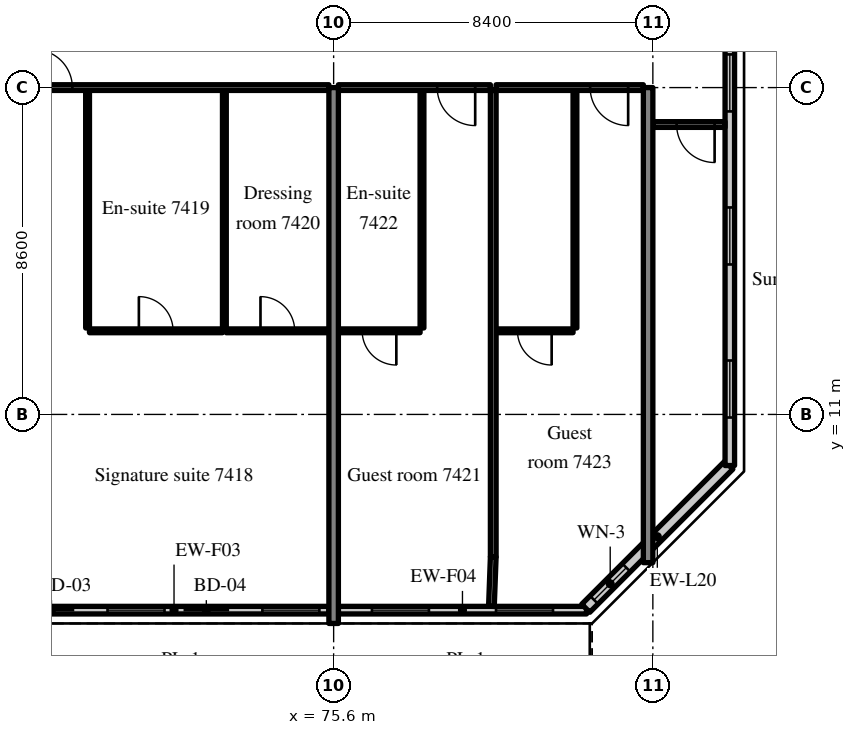
"""IFC4 building model, lengths in metres.
Left out: names, types, materials, properties, quantities, classifications, styles, units other than length and angle.
Written with IfcOpenShell. Run it as: python <this file> out.ifc"""

import sys

from ifc_helpers import new_model, si_unit, direction, frame, frame_2d, origin, place, context, subcontext, project, spatial, rectangle, extrude, source, transform, mapped, element, fill, save


model = new_model("IFC4")
c1 = context("Model", 3, precision=1e-05, world=origin(), true_north=direction((0.0, 1.0)))
c2 = subcontext(c1, "Body", "Model", "MODEL_VIEW")
j1 = project(units=[si_unit("LENGTHUNIT", "METRE"), si_unit("PLANEANGLEUNIT", "RADIAN")], contexts=[c1])
p1 = place(None, origin())
s1 = spatial("IfcSite", under=j1, at=p1, CompositionType="ELEMENT")
p2 = place(p1, origin())
s2 = spatial("IfcBuilding", under=s1, at=p2, CompositionType="ELEMENT")
p3 = place(p2, frame((0.0, 0.0, 309.7)))
s3 = spatial("IfcBuildingStorey", under=s2, at=p3, CompositionType="ELEMENT", Elevation=309.7)
m1 = source(origin(), c2, "Body", "SweptSolid", [
    extrude(rectangle(XDim=14.1, YDim=0.25, at=frame_2d((7.05, 0.0))), origin(), (0.0, 0.0, 1.0), 3.72),
])
p4 = place(p3, frame((75.6, 5.5, 0.0), z_axis=(0.0, 0.0, 1.0), x_axis=(0.0, 1.0, 0.0)))
e1 = element("IfcWall", 1, at=p4, inside=s3, PredefinedType="SHEAR", context=c2, shape_type="MappedRepresentation", body=[
    mapped(m1, transform((0.0, 0.0, 0.0), scale=1.0)),
])
m2 = source(origin(), c2, "Body", "SweptSolid", [
    extrude(rectangle(XDim=12.5, YDim=0.25, at=frame_2d((6.25, 0.0))), origin(), (0.0, 0.0, 1.0), 3.72),
])
p5 = place(p3, frame((83.875, 7.1, 0.0), z_axis=(0.0, 0.0, 1.0), x_axis=(0.0, 1.0, 0.0)))
e2 = element("IfcWall", 2, at=p5, inside=s3, PredefinedType="SHEAR", context=c2, shape_type="MappedRepresentation", body=[
    mapped(m2, transform((0.0, 0.0, 0.0), scale=1.0)),
])
m3 = source(origin(), c2, "Body", "SweptSolid", [
    extrude(rectangle(XDim=8.15, YDim=0.2, at=frame_2d((4.075, 0.0))), origin(), (0.0, 0.0, 1.0), 3.17),
])
p6 = place(p3, frame((67.325, 5.85, 0.0), z_axis=(0.0, 0.0, 1.0), x_axis=(1.0, 0.0, 0.0)))
e3 = element("IfcWall", 3, at=p6, inside=s3, PredefinedType="SOLIDWALL", context=c2, shape_type="MappedRepresentation", body=[
    mapped(m3, transform((0.0, 0.0, 0.0), scale=1.0)),
])
m4 = source(origin(), c2, "Body", "SweptSolid", [
    extrude(rectangle(XDim=1.2, YDim=2.4, at=frame_2d((0.6, 1.2))), frame((0.0, 0.11, 0.0), z_axis=(0.0, -1.0, 0.0), x_axis=(1.0, 0.0, 0.0)), (0.0, 0.0, 1.0), 0.22),
])
p7 = place(p6, frame((0.25, 0.0, 0.0)))
e4 = element("IfcOpeningElement", 4, at=p7, cuts=e3, PredefinedType="OPENING", context=c2, shape_type="MappedRepresentation", body=[
    mapped(m4, transform((0.0, 0.0, 0.0), scale=1.0)),
])
m5 = source(origin(), c2, "Body", "SweptSolid", [
    extrude(rectangle(XDim=1.5, YDim=1.5, at=frame_2d((0.75, 0.75))), frame((0.0, 0.11, 0.0), z_axis=(0.0, -1.0, 0.0), x_axis=(1.0, 0.0, 0.0)), (0.0, 0.0, 1.0), 0.22),
])
p8 = place(p6, frame((2.325, 0.0, 0.9)))
e5 = element("IfcOpeningElement", 5, at=p8, cuts=e3, PredefinedType="OPENING", context=c2, shape_type="MappedRepresentation", body=[
    mapped(m5, transform((0.0, 0.0, 0.0), scale=1.0)),
])
p9 = place(p6, frame((4.325, 0.0, 0.0)))
e6 = element("IfcOpeningElement", 6, at=p9, cuts=e3, PredefinedType="OPENING", context=c2, shape_type="MappedRepresentation", body=[
    mapped(m4, transform((0.0, 0.0, 0.0), scale=1.0)),
])
p10 = place(p6, frame((6.4, 0.0, 0.9)))
e7 = element("IfcOpeningElement", 7, at=p10, cuts=e3, PredefinedType="OPENING", context=c2, shape_type="MappedRepresentation", body=[
    mapped(m5, transform((0.0, 0.0, 0.0), scale=1.0)),
])
m6 = source(origin(), c2, "Body", "SweptSolid", [
    extrude(rectangle(XDim=6.53, YDim=0.2, at=frame_2d((3.265, 0.0))), origin(), (0.0, 0.0, 1.0), 3.17),
])
p11 = place(p3, frame((75.725, 5.85, 0.0), z_axis=(0.0, 0.0, 1.0), x_axis=(1.0, 0.0, 0.0)))
e8 = element("IfcWall", 8, at=p11, inside=s3, PredefinedType="SOLIDWALL", context=c2, shape_type="MappedRepresentation", body=[
    mapped(m6, transform((0.0, 0.0, 0.0), scale=1.0)),
])
p12 = place(p11, frame((0.883, 0.0, 0.9)))
e9 = element("IfcOpeningElement", 9, at=p12, cuts=e8, PredefinedType="OPENING", context=c2, shape_type="MappedRepresentation", body=[
    mapped(m5, transform((0.0, 0.0, 0.0), scale=1.0)),
])
p13 = place(p11, frame((4.147, 0.0, 0.9)))
e10 = element("IfcOpeningElement", 10, at=p13, cuts=e8, PredefinedType="OPENING", context=c2, shape_type="MappedRepresentation", body=[
    mapped(m5, transform((0.0, 0.0, 0.0), scale=1.0)),
])
m7 = source(origin(), c2, "Body", "SweptSolid", [
    extrude(rectangle(XDim=5.326, YDim=0.3, at=frame_2d((2.663, 0.0))), origin(), (0.0, 0.0, 1.0), 3.72),
])
p14 = place(p3, frame((82.234, 5.9, 0.0), z_axis=(0.0, 0.0, 1.0), x_axis=(0.707083859269, 0.707129702361, 0.0)))
e11 = element("IfcWall", 11, at=p14, inside=s3, PredefinedType="SOLIDWALL", context=c2, shape_type="MappedRepresentation", body=[
    mapped(m7, transform((0.0, 0.0, 0.0), scale=1.0)),
])
m8 = source(origin(), c2, "Body", "SweptSolid", [
    extrude(rectangle(XDim=1.2, YDim=1.5, at=frame_2d((0.6, 0.75))), frame((0.0, 0.16, 0.0), z_axis=(0.0, -1.0, 0.0), x_axis=(1.0, 0.0, 0.0)), (0.0, 0.0, 1.0), 0.32),
])
p15 = place(p14, frame((0.31, 0.0, 0.9)))
e12 = element("IfcOpeningElement", 12, at=p15, cuts=e11, PredefinedType="OPENING", context=c2, shape_type="MappedRepresentation", body=[
    mapped(m8, transform((0.0, 0.0, 0.0), scale=1.0)),
])
m9 = source(origin(), c2, "Body", "SweptSolid", [
    extrude(rectangle(XDim=28.189, YDim=0.25, at=frame_2d((14.095, 0.0))), origin(), (0.0, 0.0, 1.0), 3.72),
])
p16 = place(p3, frame((86.025, 9.655, 0.0), z_axis=(0.0, 0.0, 1.0), x_axis=(0.0, 1.0, 0.0)))
e13 = element("IfcWall", 13, at=p16, inside=s3, PredefinedType="SOLIDWALL", context=c2, shape_type="MappedRepresentation", body=[
    mapped(m9, transform((0.0, 0.0, 0.0), scale=1.0)),
])
m10 = source(origin(), c2, "Body", "SweptSolid", [
    extrude(rectangle(XDim=1.5, YDim=1.5, at=frame_2d((0.75, 0.75))), frame((0.0, 0.135, 0.0), z_axis=(0.0, -1.0, 0.0), x_axis=(1.0, 0.0, 0.0)), (0.0, 0.0, 1.0), 0.27),
])
p17 = place(p16, frame((1.263, 0.0, 0.9)))
e14 = element("IfcOpeningElement", 14, at=p17, cuts=e13, PredefinedType="OPENING", context=c2, shape_type="MappedRepresentation", body=[
    mapped(m10, transform((0.0, 0.0, 0.0), scale=1.0)),
])
p18 = place(p16, frame((5.291, 0.0, 0.9)))
e15 = element("IfcOpeningElement", 15, at=p18, cuts=e13, PredefinedType="OPENING", context=c2, shape_type="MappedRepresentation", body=[
    mapped(m10, transform((0.0, 0.0, 0.0), scale=1.0)),
])
p19 = place(p16, frame((9.318, 0.0, 0.9)))
e16 = element("IfcOpeningElement", 16, at=p19, cuts=e13, PredefinedType="OPENING", context=c2, shape_type="MappedRepresentation", body=[
    mapped(m10, transform((0.0, 0.0, 0.0), scale=1.0)),
])
p20 = place(p16, frame((13.345, 0.0, 0.9)))
e17 = element("IfcOpeningElement", 17, at=p20, cuts=e13, PredefinedType="OPENING", context=c2, shape_type="MappedRepresentation", body=[
    mapped(m10, transform((0.0, 0.0, 0.0), scale=1.0)),
])
p21 = place(p16, frame((17.372, 0.0, 0.9)))
e18 = element("IfcOpeningElement", 18, at=p21, cuts=e13, PredefinedType="OPENING", context=c2, shape_type="MappedRepresentation", body=[
    mapped(m10, transform((0.0, 0.0, 0.0), scale=1.0)),
])
p22 = place(p16, frame((21.399, 0.0, 0.9)))
e19 = element("IfcOpeningElement", 19, at=p22, cuts=e13, PredefinedType="OPENING", context=c2, shape_type="MappedRepresentation", body=[
    mapped(m10, transform((0.0, 0.0, 0.0), scale=1.0)),
])
p23 = place(p16, frame((25.426, 0.0, 0.9)))
e20 = element("IfcOpeningElement", 20, at=p23, cuts=e13, PredefinedType="OPENING", context=c2, shape_type="MappedRepresentation", body=[
    mapped(m10, transform((0.0, 0.0, 0.0), scale=1.0)),
])
m11 = source(origin(), c2, "Body", "SweptSolid", [
    extrude(rectangle(XDim=6.25, YDim=0.1, at=frame_2d((3.125, 0.0))), origin(), (0.0, 0.0, 1.0), 3.72),
])
for number, where, z_axis, x_axis in (
    (21, (69.125, 13.275, 0.0), (0.0, 0.0, 1.0), (0.0, 1.0, 0.0)),
    (22, (72.725, 13.275, 0.0), (0.0, 0.0, 1.0), (0.0, 1.0, 0.0)),
):
    element("IfcWall", number, at=place(p3, frame(where, z_axis=z_axis, x_axis=x_axis)), inside=s3, PredefinedType="PARTITIONING", context=c2, shape_type="MappedRepresentation", body=[
        mapped(m11, transform((0.0, 0.0, 0.0), scale=1.0)),
    ])
m12 = source(origin(), c2, "Body", "SweptSolid", [
    extrude(rectangle(XDim=3.5, YDim=0.1, at=frame_2d((1.75, 0.0))), origin(), (0.0, 0.0, 1.0), 3.72),
])
p24 = place(p3, frame((69.175, 13.2, 0.0), z_axis=(0.0, 0.0, 1.0), x_axis=(1.0, 0.0, 0.0)))
e23 = element("IfcWall", 23, at=p24, inside=s3, PredefinedType="PARTITIONING", context=c2, shape_type="MappedRepresentation", body=[
    mapped(m12, transform((0.0, 0.0, 0.0), scale=1.0)),
])
m13 = source(origin(), c2, "Body", "SweptSolid", [
    extrude(rectangle(XDim=0.9, YDim=2.1, at=frame_2d((0.45, 1.05))), frame((0.0, 0.06, 0.0), z_axis=(0.0, -1.0, 0.0), x_axis=(1.0, 0.0, 0.0)), (0.0, 0.0, 1.0), 0.12),
])
p25 = place(p24, frame((1.3, 0.0, 0.0)))
e24 = element("IfcOpeningElement", 24, at=p25, cuts=e23, PredefinedType="OPENING", context=c2, shape_type="MappedRepresentation", body=[
    mapped(m13, transform((0.0, 0.0, 0.0), scale=1.0)),
])
m14 = source(origin(), c2, "Body", "SweptSolid", [
    extrude(rectangle(XDim=2.7, YDim=0.1, at=frame_2d((1.35, 0.0))), origin(), (0.0, 0.0, 1.0), 3.72),
])
p26 = place(p3, frame((72.775, 13.2, 0.0), z_axis=(0.0, 0.0, 1.0), x_axis=(1.0, 0.0, 0.0)))
e25 = element("IfcWall", 25, at=p26, inside=s3, PredefinedType="PARTITIONING", context=c2, shape_type="MappedRepresentation", body=[
    mapped(m14, transform((0.0, 0.0, 0.0), scale=1.0)),
])
p27 = place(p26, frame((0.9, 0.0, 0.0)))
e26 = element("IfcOpeningElement", 26, at=p27, cuts=e25, PredefinedType="OPENING", context=c2, shape_type="MappedRepresentation", body=[
    mapped(m13, transform((0.0, 0.0, 0.0), scale=1.0)),
])
m15 = source(origin(), c2, "Body", "SweptSolid", [
    extrude(rectangle(XDim=8.15, YDim=0.15, at=frame_2d((4.075, 0.0))), origin(), (0.0, 0.0, 1.0), 3.02),
])
p28 = place(p3, frame((67.325, 19.6, 0.0), z_axis=(0.0, 0.0, 1.0), x_axis=(1.0, 0.0, 0.0)))
e27 = element("IfcWall", 27, at=p28, inside=s3, PredefinedType="PARTITIONING", context=c2, shape_type="MappedRepresentation", body=[
    mapped(m15, transform((0.0, 0.0, 0.0), scale=1.0)),
])
m16 = source(origin(), c2, "Body", "SweptSolid", [
    extrude(rectangle(XDim=1.0, YDim=2.1, at=frame_2d((0.5, 1.05))), frame((0.0, 0.085, 0.0), z_axis=(0.0, -1.0, 0.0), x_axis=(1.0, 0.0, 0.0)), (0.0, 0.0, 1.0), 0.17),
])
p29 = place(p28, frame((0.4, 0.0, 0.0)))
e28 = element("IfcOpeningElement", 28, at=p29, cuts=e27, PredefinedType="OPENING", context=c2, shape_type="MappedRepresentation", body=[
    mapped(m16, transform((0.0, 0.0, 0.0), scale=1.0)),
])
p30 = place(p3, frame((77.925, 13.275, 0.0), z_axis=(0.0, 0.0, 1.0), x_axis=(0.0, 1.0, 0.0)))
e29 = element("IfcWall", 29, at=p30, inside=s3, PredefinedType="PARTITIONING", context=c2, shape_type="MappedRepresentation", body=[
    mapped(m11, transform((0.0, 0.0, 0.0), scale=1.0)),
])
m17 = source(origin(), c2, "Body", "SweptSolid", [
    extrude(rectangle(XDim=2.15, YDim=0.1, at=frame_2d((1.075, 0.0))), origin(), (0.0, 0.0, 1.0), 3.72),
])
p31 = place(p3, frame((75.725, 13.2, 0.0), z_axis=(0.0, 0.0, 1.0), x_axis=(1.0, 0.0, 0.0)))
e30 = element("IfcWall", 30, at=p31, inside=s3, PredefinedType="PARTITIONING", context=c2, shape_type="MappedRepresentation", body=[
    mapped(m17, transform((0.0, 0.0, 0.0), scale=1.0)),
])
p32 = place(p31, frame((0.625, 0.0, 0.0)))
e31 = element("IfcOpeningElement", 31, at=p32, cuts=e30, PredefinedType="OPENING", context=c2, shape_type="MappedRepresentation", body=[
    mapped(m13, transform((0.0, 0.0, 0.0), scale=1.0)),
])
m18 = source(origin(), c2, "Body", "SweptSolid", [
    extrude(rectangle(XDim=4.0, YDim=0.15, at=frame_2d((2.0, 0.0))), origin(), (0.0, 0.0, 1.0), 3.02),
])
p33 = place(p3, frame((75.725, 19.6, 0.0), z_axis=(0.0, 0.0, 1.0), x_axis=(1.0, 0.0, 0.0)))
e32 = element("IfcWall", 32, at=p33, inside=s3, PredefinedType="PARTITIONING", context=c2, shape_type="MappedRepresentation", body=[
    mapped(m18, transform((0.0, 0.0, 0.0), scale=1.0)),
])
p34 = place(p33, frame((2.6, 0.0, 0.0)))
e33 = element("IfcOpeningElement", 33, at=p34, cuts=e32, PredefinedType="OPENING", context=c2, shape_type="MappedRepresentation", body=[
    mapped(m16, transform((0.0, 0.0, 0.0), scale=1.0)),
])
p35 = place(p3, frame((81.95, 13.275, 0.0), z_axis=(0.0, 0.0, 1.0), x_axis=(0.0, 1.0, 0.0)))
e34 = element("IfcWall", 34, at=p35, inside=s3, PredefinedType="PARTITIONING", context=c2, shape_type="MappedRepresentation", body=[
    mapped(m11, transform((0.0, 0.0, 0.0), scale=1.0)),
])
m19 = source(origin(), c2, "Body", "SweptSolid", [
    extrude(rectangle(XDim=2.025, YDim=0.1, at=frame_2d((1.012, 0.0))), origin(), (0.0, 0.0, 1.0), 3.72),
])
p36 = place(p3, frame((79.875, 13.2, 0.0), z_axis=(0.0, 0.0, 1.0), x_axis=(1.0, 0.0, 0.0)))
e35 = element("IfcWall", 35, at=p36, inside=s3, PredefinedType="PARTITIONING", context=c2, shape_type="MappedRepresentation", body=[
    mapped(m19, transform((0.0, 0.0, 0.0), scale=1.0)),
])
p37 = place(p36, frame((0.562, 0.0, 0.0)))
e36 = element("IfcOpeningElement", 36, at=p37, cuts=e35, PredefinedType="OPENING", context=c2, shape_type="MappedRepresentation", body=[
    mapped(m13, transform((0.0, 0.0, 0.0), scale=1.0)),
])
m20 = source(origin(), c2, "Body", "SweptSolid", [
    extrude(rectangle(XDim=3.875, YDim=0.15, at=frame_2d((1.938, 0.0))), origin(), (0.0, 0.0, 1.0), 3.02),
])
p38 = place(p3, frame((79.875, 19.6, 0.0), z_axis=(0.0, 0.0, 1.0), x_axis=(1.0, 0.0, 0.0)))
e37 = element("IfcWall", 37, at=p38, inside=s3, PredefinedType="PARTITIONING", context=c2, shape_type="MappedRepresentation", body=[
    mapped(m20, transform((0.0, 0.0, 0.0), scale=1.0)),
])
p39 = place(p38, frame((2.475, 0.0, 0.0)))
e38 = element("IfcOpeningElement", 38, at=p39, cuts=e37, PredefinedType="OPENING", context=c2, shape_type="MappedRepresentation", body=[
    mapped(m16, transform((0.0, 0.0, 0.0), scale=1.0)),
])
m21 = source(origin(), c2, "Body", "SweptSolid", [
    extrude(rectangle(XDim=12.275, YDim=0.15, at=frame_2d((6.137, 0.0))), origin(), (0.0, 0.0, 1.0), 3.72),
])
p40 = place(p3, frame((79.8, 7.25, 0.0), z_axis=(0.0, 0.0, 1.0), x_axis=(0.0, 1.0, 0.0)))
e39 = element("IfcWall", 39, at=p40, inside=s3, PredefinedType="PARTITIONING", context=c2, shape_type="MappedRepresentation", body=[
    mapped(m21, transform((0.0, 0.0, 0.0), scale=1.0)),
])
m22 = source(origin(), c2, "Body", "SweptSolid", [
    extrude(rectangle(XDim=1.9, YDim=0.15, at=frame_2d((0.95, 0.0))), origin(), (0.0, 0.0, 1.0), 3.02),
])
p41 = place(p3, frame((84.0, 18.628, 0.0), z_axis=(0.0, 0.0, 1.0), x_axis=(1.0, 0.0, 0.0)))
e40 = element("IfcWall", 40, at=p41, inside=s3, PredefinedType="PARTITIONING", context=c2, shape_type="MappedRepresentation", body=[
    mapped(m22, transform((0.0, 0.0, 0.0), scale=1.0)),
])
p42 = place(p41, frame((0.625, 0.0, 0.0)))
e41 = element("IfcOpeningElement", 41, at=p42, cuts=e40, PredefinedType="OPENING", context=c2, shape_type="MappedRepresentation", body=[
    mapped(m16, transform((0.0, 0.0, 0.0), scale=1.0)),
])
m23 = source(origin(), c2, "Body", "SweptSolid", [
    extrude(rectangle(XDim=1.301, YDim=0.15, at=frame_2d((0.65, 0.0))), origin(), (0.0, 0.0, 1.0), 3.72),
])
p43 = place(p3, frame((79.752, 5.95, 0.0), z_axis=(0.0, 0.0, 1.0), x_axis=(0.036970014262, 0.999316375351, 0.0)))
e42 = element("IfcWall", 42, at=p43, inside=s3, PredefinedType="PARTITIONING", context=c2, shape_type="MappedRepresentation", body=[
    mapped(m23, transform((0.0, 0.0, 0.0), scale=1.0)),
])
m24 = source(origin(), c2, "Body", "SweptSolid", [
    extrude(rectangle(XDim=1.2, YDim=2.4, at=frame_2d((0.6, 1.2))), frame((0.0, 0.025, 0.0), z_axis=(0.0, -1.0, 0.0), x_axis=(1.0, 0.0, 0.0)), (0.0, 0.0, 1.0), 0.05),
])
p44 = place(p7, origin())
e43 = element("IfcDoor", 43, at=p44, inside=s3, OperationType="SLIDING_TO_LEFT", PredefinedType="DOOR", context=c2, shape_type="MappedRepresentation", body=[
    mapped(m24, transform((0.0, 0.0, 0.0), scale=1.0)),
])
fill(e4, e43)
m25 = source(origin(), c2, "Body", "SweptSolid", [
    extrude(rectangle(XDim=1.5, YDim=1.5, at=frame_2d((0.75, 0.75))), frame((0.0, 0.03, 0.0), z_axis=(0.0, -1.0, 0.0), x_axis=(1.0, 0.0, 0.0)), (0.0, 0.0, 1.0), 0.06),
])
p45 = place(p8, origin())
e44 = element("IfcWindow", 44, at=p45, inside=s3, PartitioningType="SINGLE_PANEL", PredefinedType="WINDOW", context=c2, shape_type="MappedRepresentation", body=[
    mapped(m25, transform((0.0, 0.0, 0.0), scale=1.0)),
])
fill(e5, e44)
p46 = place(p9, origin())
e45 = element("IfcDoor", 45, at=p46, inside=s3, OperationType="SLIDING_TO_RIGHT", PredefinedType="DOOR", context=c2, shape_type="MappedRepresentation", body=[
    mapped(m24, transform((0.0, 0.0, 0.0), scale=1.0)),
])
fill(e6, e45)
p47 = place(p10, origin())
e46 = element("IfcWindow", 46, at=p47, inside=s3, PartitioningType="SINGLE_PANEL", PredefinedType="WINDOW", context=c2, shape_type="MappedRepresentation", body=[
    mapped(m25, transform((0.0, 0.0, 0.0), scale=1.0)),
])
fill(e7, e46)
p48 = place(p12, origin())
e47 = element("IfcWindow", 47, at=p48, inside=s3, PartitioningType="SINGLE_PANEL", PredefinedType="WINDOW", context=c2, shape_type="MappedRepresentation", body=[
    mapped(m25, transform((0.0, 0.0, 0.0), scale=1.0)),
])
fill(e9, e47)
p49 = place(p13, origin())
e48 = element("IfcWindow", 48, at=p49, inside=s3, PartitioningType="SINGLE_PANEL", PredefinedType="WINDOW", context=c2, shape_type="MappedRepresentation", body=[
    mapped(m25, transform((0.0, 0.0, 0.0), scale=1.0)),
])
fill(e10, e48)
m26 = source(origin(), c2, "Body", "SweptSolid", [
    extrude(rectangle(XDim=1.2, YDim=1.5, at=frame_2d((0.6, 0.75))), frame((0.0, 0.03, 0.0), z_axis=(0.0, -1.0, 0.0), x_axis=(1.0, 0.0, 0.0)), (0.0, 0.0, 1.0), 0.06),
])
p50 = place(p15, origin())
e49 = element("IfcWindow", 49, at=p50, inside=s3, PartitioningType="SINGLE_PANEL", PredefinedType="WINDOW", context=c2, shape_type="MappedRepresentation", body=[
    mapped(m26, transform((0.0, 0.0, 0.0), scale=1.0)),
])
fill(e12, e49)
p51 = place(p17, origin())
e50 = element("IfcWindow", 50, at=p51, inside=s3, PartitioningType="SINGLE_PANEL", PredefinedType="WINDOW", context=c2, shape_type="MappedRepresentation", body=[
    mapped(m25, transform((0.0, 0.0, 0.0), scale=1.0)),
])
fill(e14, e50)
p52 = place(p18, origin())
e51 = element("IfcWindow", 51, at=p52, inside=s3, PartitioningType="SINGLE_PANEL", PredefinedType="WINDOW", context=c2, shape_type="MappedRepresentation", body=[
    mapped(m25, transform((0.0, 0.0, 0.0), scale=1.0)),
])
fill(e15, e51)
p53 = place(p19, origin())
e52 = element("IfcWindow", 52, at=p53, inside=s3, PartitioningType="SINGLE_PANEL", PredefinedType="WINDOW", context=c2, shape_type="MappedRepresentation", body=[
    mapped(m25, transform((0.0, 0.0, 0.0), scale=1.0)),
])
fill(e16, e52)
m27 = source(origin(), c2, "Body", "SweptSolid", [
    extrude(rectangle(XDim=0.9, YDim=2.1, at=frame_2d((0.45, 1.05))), frame((0.0, 0.025, 0.0), z_axis=(0.0, -1.0, 0.0), x_axis=(1.0, 0.0, 0.0)), (0.0, 0.0, 1.0), 0.05),
])
p54 = place(p25, origin())
e53 = element("IfcDoor", 53, at=p54, inside=s3, OperationType="SINGLE_SWING_LEFT", PredefinedType="DOOR", context=c2, shape_type="MappedRepresentation", body=[
    mapped(m27, transform((0.0, 0.0, 0.0), scale=1.0)),
])
fill(e24, e53)
p55 = place(p27, origin())
e54 = element("IfcDoor", 54, at=p55, inside=s3, OperationType="SINGLE_SWING_LEFT", PredefinedType="DOOR", context=c2, shape_type="MappedRepresentation", body=[
    mapped(m27, transform((0.0, 0.0, 0.0), scale=1.0)),
])
fill(e26, e54)
m28 = source(origin(), c2, "Body", "SweptSolid", [
    extrude(rectangle(XDim=1.0, YDim=2.1, at=frame_2d((0.5, 1.05))), frame((0.0, 0.025, 0.0), z_axis=(0.0, -1.0, 0.0), x_axis=(1.0, 0.0, 0.0)), (0.0, 0.0, 1.0), 0.05),
])
p56 = place(p29, origin())
e55 = element("IfcDoor", 55, at=p56, inside=s3, OperationType="SINGLE_SWING_LEFT", PredefinedType="DOOR", context=c2, shape_type="MappedRepresentation", body=[
    mapped(m28, transform((0.0, 0.0, 0.0), scale=1.0)),
])
fill(e28, e55)
p57 = place(p32, origin())
e56 = element("IfcDoor", 56, at=p57, inside=s3, OperationType="SINGLE_SWING_RIGHT", PredefinedType="DOOR", context=c2, shape_type="MappedRepresentation", body=[
    mapped(m27, transform((0.0, 0.0, 0.0), scale=1.0)),
])
fill(e31, e56)
p58 = place(p34, origin())
e57 = element("IfcDoor", 57, at=p58, inside=s3, OperationType="SINGLE_SWING_RIGHT", PredefinedType="DOOR", context=c2, shape_type="MappedRepresentation", body=[
    mapped(m28, transform((0.0, 0.0, 0.0), scale=1.0)),
])
fill(e33, e57)
p59 = place(p37, origin())
e58 = element("IfcDoor", 58, at=p59, inside=s3, OperationType="SINGLE_SWING_RIGHT", PredefinedType="DOOR", context=c2, shape_type="MappedRepresentation", body=[
    mapped(m27, transform((0.0, 0.0, 0.0), scale=1.0)),
])
fill(e36, e58)
p60 = place(p39, origin())
e59 = element("IfcDoor", 59, at=p60, inside=s3, OperationType="SINGLE_SWING_RIGHT", PredefinedType="DOOR", context=c2, shape_type="MappedRepresentation", body=[
    mapped(m28, transform((0.0, 0.0, 0.0), scale=1.0)),
])
fill(e38, e59)
p61 = place(p42, origin())
e60 = element("IfcDoor", 60, at=p61, inside=s3, OperationType="SINGLE_SWING_RIGHT", PredefinedType="DOOR", context=c2, shape_type="MappedRepresentation", body=[
    mapped(m28, transform((0.0, 0.0, 0.0), scale=1.0)),
])
fill(e41, e60)
save(model, sys.argv[1])
